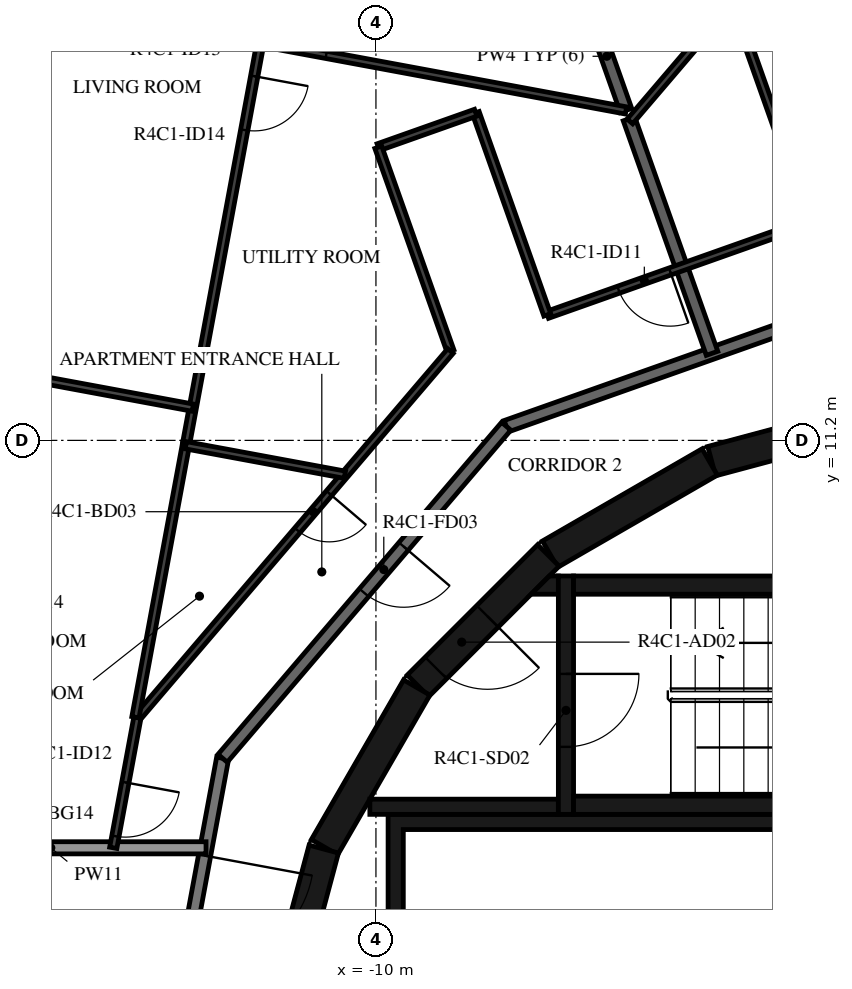
"""IFC4 building model, lengths in metres.
Left out: names, types, materials, properties, quantities, classifications, styles, units other than length and angle.
Written with IfcOpenShell. Run it as: python <this file> out.ifc"""

import sys

from ifc_helpers import new_model, si_unit, direction, frame, frame_2d, origin, place, context, subcontext, project, spatial, polyline, rectangle, outline, extrude, element, fill, save


model = new_model("IFC4")
c1 = context("Model", 3, precision=1e-05, world=origin(), true_north=direction((0.0, 1.0)))
c2 = subcontext(c1, "Body", "Model", "MODEL_VIEW")
j1 = project(units=[si_unit("LENGTHUNIT", "METRE"), si_unit("PLANEANGLEUNIT", "RADIAN")], contexts=[c1])
p1 = place(None, origin())
s1 = spatial("IfcSite", under=j1, at=p1, CompositionType="ELEMENT")
p2 = place(p1, origin())
s2 = spatial("IfcBuilding", under=s1, at=p2, CompositionType="ELEMENT")
p3 = place(p2, frame((0.0, 0.0, 176.2)))
s3 = spatial("IfcBuildingStorey", under=s2, at=p3, CompositionType="ELEMENT", Elevation=176.2)
for number, where, z_axis, x_axis in (
    (1, (-1.55, 11.643, 0.0), (0.0, 0.0, 1.0), (-0.966, -0.259, 0.0)),
    (2, (-4.51, 10.845, 0.0), (0.0, 0.0, 1.0), (-0.866, -0.5, 0.0)),
):
    element("IfcWall", number, at=place(p3, frame(where, z_axis=z_axis, x_axis=x_axis)), inside=s3, PredefinedType="SHEAR", context=c2, shape_type="SweptSolid", body=[
        extrude(rectangle(XDim=3.033, YDim=0.5, at=frame_2d((1.516, 0.0))), origin(), (0.0, 0.0, 1.0), 3.12),
    ])
p4 = place(p3, frame((-7.164, 9.308, 0.0), z_axis=(0.0, 0.0, 1.0), x_axis=(-0.707106781187, -0.707106781187, 0.0)))
e3 = element("IfcWall", 3, at=p4, inside=s3, PredefinedType="SHEAR", context=c2, shape_type="SweptSolid", body=[
    extrude(rectangle(XDim=3.032, YDim=0.5, at=frame_2d((1.516, 0.0))), origin(), (0.0, 0.0, 1.0), 3.12),
])
p5 = place(p4, frame((1.416, 0.0, 0.0)))
e4 = element("IfcOpeningElement", 4, at=p5, cuts=e3, PredefinedType="OPENING", context=c2, shape_type="SweptSolid", body=[
    extrude(rectangle(XDim=1.2, YDim=2.1, at=frame_2d((0.6, 1.05))), frame((0.0, 0.26, 0.0), z_axis=(0.0, -1.0, 0.0), x_axis=(1.0, 0.0, 0.0)), (0.0, 0.0, 1.0), 0.52),
])
for number, where, z_axis, x_axis in (
    (5, (-9.329, 7.137, 0.0), (0.0, 0.0, 1.0), (-0.5, -0.866, 0.0)),
    (6, (-10.858, 4.479, 0.0), (0.0, 0.0, 1.0), (-0.259, -0.966, 0.0)),
):
    element("IfcWall", number, at=place(p3, frame(where, z_axis=z_axis, x_axis=x_axis)), inside=s3, PredefinedType="SHEAR", context=c2, shape_type="SweptSolid", body=[
        extrude(rectangle(XDim=3.033, YDim=0.5, at=frame_2d((1.516, 0.0))), origin(), (0.0, 0.0, 1.0), 3.12),
    ])
for number, where, z_axis, x_axis in (
    (7, (-6.75, 5.2, 0.0), (0.0, 0.0, 1.0), (1.0, 0.0, 0.0)),
    (8, (-6.75, 8.82, 0.0), (0.0, 0.0, 1.0), (1.0, 0.0, 0.0)),
):
    element("IfcWall", number, at=place(p3, frame(where, z_axis=z_axis, x_axis=x_axis)), inside=s3, PredefinedType="SHEAR", context=c2, shape_type="SweptSolid", body=[
        extrude(rectangle(XDim=6.75, YDim=0.3, at=frame_2d((3.375, 0.0))), origin(), (0.0, 0.0, 1.0), 3.12),
    ])
p6 = place(p3, frame((-6.875, 8.97, 0.0), z_axis=(0.0, 0.0, 1.0), x_axis=(0.0, -1.0, 0.0)))
e9 = element("IfcWall", 9, at=p6, inside=s3, PredefinedType="SHEAR", context=c2, shape_type="SweptSolid", body=[
    extrude(rectangle(XDim=3.92, YDim=0.25, at=frame_2d((1.96, 0.0))), origin(), (0.0, 0.0, 1.0), 3.12),
])
p7 = place(p6, frame((1.61, 0.0, 0.0)))
e10 = element("IfcOpeningElement", 10, at=p7, cuts=e9, PredefinedType="OPENING", context=c2, shape_type="SweptSolid", body=[
    extrude(rectangle(XDim=1.2, YDim=2.1, at=frame_2d((0.6, 1.05))), frame((0.0, 0.135, 0.0), z_axis=(0.0, -1.0, 0.0), x_axis=(1.0, 0.0, 0.0)), (0.0, 0.0, 1.0), 0.27),
])
p8 = place(p3, frame((-7.0, 5.175, 0.0), z_axis=(0.0, 0.0, 1.0), x_axis=(-1.0, 0.0, 0.0)))
e11 = element("IfcWall", 11, at=p8, inside=s3, PredefinedType="SHEAR", context=c2, shape_type="SweptSolid", body=[
    extrude(rectangle(XDim=3.1, YDim=0.25, at=frame_2d((1.55, 0.0))), origin(), (0.0, 0.0, 1.0), 3.12),
])
p9 = place(p3, origin())
e12 = element("IfcWall", 12, at=p9, inside=s3, PredefinedType="SHEAR", context=c2, shape_type="SweptSolid", body=[
    extrude(outline(polyline([(-7.148, 8.97), (-7.0, 8.97), (-7.0, 8.67), (-7.448, 8.67), (-7.148, 8.97)])), origin(), (0.0, 0.0, 1.0), 3.12),
])
p10 = place(p3, origin())
e13 = element("IfcWall", 13, at=p10, inside=s3, PredefinedType="SHEAR", context=c2, shape_type="SweptSolid", body=[
    extrude(outline(polyline([(-9.55, 4.8), (-1.2, 4.8), (-1.2, 1.9), (-0.95, 1.9), (-0.95, 4.8), (0.95, 4.8), (0.95, 1.9), (1.2, 1.9), (1.2, 4.8), (3.1, 4.8), (3.1, 1.9), (3.35, 1.9), (3.35, 4.8), (5.25, 4.8), (5.25, 1.9), (5.5, 1.9), (5.5, 4.8), (7.4, 4.8), (7.4, 1.9), (7.65, 1.9), (7.65, 4.8), (9.55, 4.8), (9.55, 1.9), (9.8, 1.9), (9.8, 4.8), (9.8, 5.05), (-9.8, 5.05), (-9.8, 4.8), (-9.8, 1.9), (-9.55, 1.9), (-9.55, 4.8)])), origin(), (0.0, 0.0, 1.0), 3.12),
])
p11 = place(p3, frame((-12.521, 5.972, 0.0), z_axis=(0.0, 0.0, 1.0), x_axis=(-0.182251559718, -0.983251935661, 0.0)))
e14 = element("IfcWall", 14, at=p11, inside=s3, PredefinedType="STANDARD", context=c2, shape_type="SweptSolid", body=[
    extrude(rectangle(XDim=5.117, YDim=0.2, at=frame_2d((2.559, 0.0))), origin(), (0.0, 0.0, 1.0), 3.12),
])
p12 = place(p11, frame((1.627, 0.0, 0.0)))
e15 = element("IfcOpeningElement", 15, at=p12, cuts=e14, PredefinedType="OPENING", context=c2, shape_type="SweptSolid", body=[
    extrude(rectangle(XDim=1.8, YDim=2.1, at=frame_2d((0.9, 1.05))), frame((0.0, 0.11, 0.0), z_axis=(0.0, -1.0, 0.0), x_axis=(1.0, 0.0, 0.0)), (0.0, 0.0, 1.0), 0.22),
])
p13 = place(p3, frame((-2.359, 13.38, 0.0), z_axis=(0.0, 0.0, 1.0), x_axis=(-0.942647529236, -0.333789807551, 0.0)))
e16 = element("IfcWall", 16, at=p13, inside=s3, PredefinedType="STANDARD", context=c2, shape_type="SweptSolid", body=[
    extrude(rectangle(XDim=5.833, YDim=0.2, at=frame_2d((2.917, 0.0))), origin(), (0.0, 0.0, 1.0), 3.12),
])
p14 = place(p3, frame((-7.858, 11.433, 0.0), z_axis=(0.0, 0.0, 1.0), x_axis=(-0.649440801937, -0.760412154545, 0.0)))
e17 = element("IfcWall", 17, at=p14, inside=s3, PredefinedType="STANDARD", context=c2, shape_type="SweptSolid", body=[
    extrude(rectangle(XDim=7.181, YDim=0.2, at=frame_2d((3.59, 0.0))), origin(), (0.0, 0.0, 1.0), 3.12),
])
p15 = place(p14, frame((2.6, 0.0, 0.0)))
e18 = element("IfcOpeningElement", 18, at=p15, cuts=e17, PredefinedType="OPENING", context=c2, shape_type="SweptSolid", body=[
    extrude(rectangle(XDim=1.0, YDim=2.1, at=frame_2d((0.5, 1.05))), frame((0.0, 0.11, 0.0), z_axis=(0.0, -1.0, 0.0), x_axis=(1.0, 0.0, 0.0)), (0.0, 0.0, 1.0), 0.22),
])
p16 = place(p3, frame((-12.794, 4.5, 0.0), z_axis=(0.0, 0.0, 1.0), x_axis=(-1.0, 0.0, 0.0)))
e19 = element("IfcWall", 19, at=p16, inside=s3, PredefinedType="STANDARD", context=c2, shape_type="SweptSolid", body=[
    extrude(rectangle(XDim=5.106, YDim=0.2, at=frame_2d((2.553, 0.0))), origin(), (0.0, 0.0, 1.0), 2.73),
])
p17 = place(p3, frame((-5.839, 16.488, 0.0), z_axis=(0.0, 0.0, 1.0), x_axis=(0.333840515054, -0.942629572265, 0.0)))
e20 = element("IfcWall", 20, at=p17, inside=s3, PredefinedType="STANDARD", context=c2, shape_type="SweptSolid", body=[
    extrude(rectangle(XDim=4.092, YDim=0.2, at=frame_2d((2.046, 0.0))), origin(), (0.0, 0.0, 1.0), 3.12),
])
p18 = place(p3, frame((-6.518, 18.408, 0.0), z_axis=(0.0, 0.0, 1.0), x_axis=(0.333725210903, -0.942670400303, 0.0)))
e21 = element("IfcWall", 21, at=p18, inside=s3, PredefinedType="STANDARD", context=c2, shape_type="SweptSolid", body=[
    extrude(rectangle(XDim=1.89, YDim=0.2, at=frame_2d((0.945, 0.0))), origin(), (0.0, 0.0, 1.0), 3.12),
])
p19 = place(p3, frame((8.702, 12.206, 0.0), z_axis=(0.0, 0.0, 1.0), x_axis=(-0.760401313718, 0.649453494945, 0.0)))
e22 = element("IfcWall", 22, at=p19, inside=s3, PredefinedType="PARTITIONING", context=c2, shape_type="SweptSolid", body=[
    extrude(rectangle(XDim=16.724, YDim=0.12, at=frame_2d((8.362, 0.0))), origin(), (0.0, 0.0, 1.0), 3.12),
])
p20 = place(p19, frame((0.2, 0.0, 0.0)))
e23 = element("IfcOpeningElement", 23, at=p20, cuts=e22, PredefinedType="OPENING", context=c2, shape_type="SweptSolid", body=[
    extrude(rectangle(XDim=0.9, YDim=2.1, at=frame_2d((0.45, 1.05))), frame((0.0, 0.07, 0.0), z_axis=(0.0, -1.0, 0.0), x_axis=(1.0, 0.0, 0.0)), (0.0, 0.0, 1.0), 0.14),
])
p21 = place(p19, frame((8.02, 0.0, 0.0)))
e24 = element("IfcOpeningElement", 24, at=p21, cuts=e22, PredefinedType="OPENING", context=c2, shape_type="SweptSolid", body=[
    extrude(rectangle(XDim=0.9, YDim=2.1, at=frame_2d((0.45, 1.05))), frame((0.0, 0.07, 0.0), z_axis=(0.0, -1.0, 0.0), x_axis=(1.0, 0.0, 0.0)), (0.0, 0.0, 1.0), 0.14),
])
p22 = place(p19, frame((14.412, 0.0, 0.0)))
e25 = element("IfcOpeningElement", 25, at=p22, cuts=e22, PredefinedType="OPENING", context=c2, shape_type="SweptSolid", body=[
    extrude(rectangle(XDim=0.9, YDim=2.1, at=frame_2d((0.45, 1.05))), frame((0.0, 0.07, 0.0), z_axis=(0.0, -1.0, 0.0), x_axis=(1.0, 0.0, 0.0)), (0.0, 0.0, 1.0), 0.14),
])
p23 = place(p3, frame((-4.021, 18.101, 0.0), z_axis=(0.0, 0.0, 1.0), x_axis=(0.333811035895, -0.942640012048, 0.0)))
e26 = element("IfcWall", 26, at=p23, inside=s3, PredefinedType="PARTITIONING", context=c2, shape_type="SweptSolid", body=[
    extrude(rectangle(XDim=3.505, YDim=0.12, at=frame_2d((1.752, 0.0))), origin(), (0.0, 0.0, 1.0), 3.12),
])
p24 = place(p3, frame((-2.852, 14.797, 0.0), z_axis=(0.0, 0.0, 1.0), x_axis=(-0.942629664375, -0.333840254973, 0.0)))
e27 = element("IfcWall", 27, at=p24, inside=s3, PredefinedType="PARTITIONING", context=c2, shape_type="SweptSolid", body=[
    extrude(rectangle(XDim=4.593, YDim=0.12, at=frame_2d((2.297, 0.0))), origin(), (0.0, 0.0, 1.0), 3.12),
])
p25 = place(p24, frame((2.451, 0.0, 0.0)))
e28 = element("IfcOpeningElement", 28, at=p25, cuts=e27, PredefinedType="OPENING", context=c2, shape_type="SweptSolid", body=[
    extrude(rectangle(XDim=0.9, YDim=2.1, at=frame_2d((0.45, 1.05))), frame((0.0, 0.07, 0.0), z_axis=(0.0, -1.0, 0.0), x_axis=(1.0, 0.0, 0.0)), (0.0, 0.0, 1.0), 0.14),
])
p26 = place(p3, frame((-1.79, 21.167, 0.0), z_axis=(0.0, 0.0, 1.0), x_axis=(-0.649456490412, -0.7603987553, 0.0)))
e29 = element("IfcWall", 29, at=p26, inside=s3, PredefinedType="PARTITIONING", context=c2, shape_type="SweptSolid", body=[
    extrude(rectangle(XDim=6.21, YDim=0.12, at=frame_2d((3.105, 0.0))), origin(), (0.0, 0.0, 1.0), 3.12),
])
p27 = place(p26, frame((0.2, 0.0, 0.0)))
e30 = element("IfcOpeningElement", 30, at=p27, cuts=e29, PredefinedType="OPENING", context=c2, shape_type="SweptSolid", body=[
    extrude(rectangle(XDim=0.9, YDim=2.1, at=frame_2d((0.45, 1.05))), frame((0.0, 0.07, 0.0), z_axis=(0.0, -1.0, 0.0), x_axis=(1.0, 0.0, 0.0)), (0.0, 0.0, 1.0), 0.14),
])
p28 = place(p3, frame((-7.181, 13.263, 0.0), z_axis=(0.0, 0.0, 1.0), x_axis=(-0.333822798183, 0.942635846663, 0.0)))
e31 = element("IfcWall", 31, at=p28, inside=s3, PredefinedType="PARTITIONING", context=c2, shape_type="SweptSolid", body=[
    extrude(rectangle(XDim=3.527, YDim=0.12, at=frame_2d((1.764, 0.0))), origin(), (0.0, 0.0, 1.0), 3.12),
])
p29 = place(p3, frame((-8.359, 16.588, 0.0), z_axis=(0.0, 0.0, 1.0), x_axis=(-0.942661115325, -0.333751436931, 0.0)))
e32 = element("IfcWall", 32, at=p29, inside=s3, PredefinedType="PARTITIONING", context=c2, shape_type="SweptSolid", body=[
    extrude(rectangle(XDim=1.7, YDim=0.12, at=frame_2d((0.85, 0.0))), origin(), (0.0, 0.0, 1.0), 3.12),
])
p30 = place(p3, frame((-9.961, 16.021, 0.0), z_axis=(0.0, 0.0, 1.0), x_axis=(0.333803930912, -0.94264252806, 0.0)))
e33 = element("IfcWall", 33, at=p30, inside=s3, PredefinedType="PARTITIONING", context=c2, shape_type="SweptSolid", body=[
    extrude(rectangle(XDim=3.556, YDim=0.12, at=frame_2d((1.778, 0.0))), origin(), (0.0, 0.0, 1.0), 3.12),
])
p31 = place(p3, frame((-8.774, 12.669, 0.0), z_axis=(0.0, 0.0, 1.0), x_axis=(-0.649446157105, -0.760407580855, 0.0)))
e34 = element("IfcWall", 34, at=p31, inside=s3, PredefinedType="PARTITIONING", context=c2, shape_type="SweptSolid", body=[
    extrude(rectangle(XDim=7.927, YDim=0.12, at=frame_2d((3.964, 0.0))), origin(), (0.0, 0.0, 1.0), 3.12),
])
p32 = place(p31, frame((3.074, 0.0, 0.0)))
e35 = element("IfcOpeningElement", 35, at=p32, cuts=e34, PredefinedType="OPENING", context=c2, shape_type="SweptSolid", body=[
    extrude(rectangle(XDim=0.8, YDim=2.1, at=frame_2d((0.4, 1.05))), frame((0.0, 0.07, 0.0), z_axis=(0.0, -1.0, 0.0), x_axis=(1.0, 0.0, 0.0)), (0.0, 0.0, 1.0), 0.14),
])
p33 = place(p3, frame((-13.923, 6.641, 0.0), z_axis=(0.0, 0.0, 1.0), x_axis=(-0.182209715759, -0.983259690765, 0.0)))
e36 = element("IfcWall", 36, at=p33, inside=s3, PredefinedType="PARTITIONING", context=c2, shape_type="SweptSolid", body=[
    extrude(rectangle(XDim=2.177, YDim=0.12, at=frame_2d((1.089, 0.0))), origin(), (0.0, 0.0, 1.0), 3.12),
])
p34 = place(p33, frame((1.083, 0.0, 0.0)))
e37 = element("IfcOpeningElement", 37, at=p34, cuts=e36, PredefinedType="OPENING", context=c2, shape_type="SweptSolid", body=[
    extrude(rectangle(XDim=0.9, YDim=2.1, at=frame_2d((0.45, 1.05))), frame((0.0, 0.07, 0.0), z_axis=(0.0, -1.0, 0.0), x_axis=(1.0, 0.0, 0.0)), (0.0, 0.0, 1.0), 0.14),
])
p35 = place(p3, frame((-13.955, 6.647, 0.0), z_axis=(0.0, 0.0, 1.0), x_axis=(0.182264522222, 0.983249532896, 0.0)))
e38 = element("IfcWall", 38, at=p35, inside=s3, PredefinedType="PARTITIONING", context=c2, shape_type="SweptSolid", body=[
    extrude(rectangle(XDim=4.589, YDim=0.12, at=frame_2d((2.294, 0.0))), origin(), (0.0, 0.0, 1.0), 3.12),
])
p36 = place(p3, frame((-11.899, 17.74, 0.0), z_axis=(0.0, 0.0, 1.0), x_axis=(0.983254721409, -0.182236529889, 0.0)))
e39 = element("IfcWall", 39, at=p36, inside=s3, PredefinedType="PARTITIONING", context=c2, shape_type="SweptSolid", body=[
    extrude(rectangle(XDim=6.114, YDim=0.12, at=frame_2d((3.057, 0.0))), origin(), (0.0, 0.0, 1.0), 3.12),
])
p37 = place(p36, frame((0.2, 0.0, 0.0)))
e40 = element("IfcOpeningElement", 40, at=p37, cuts=e39, PredefinedType="OPENING", context=c2, shape_type="SweptSolid", body=[
    extrude(rectangle(XDim=0.9, YDim=2.1, at=frame_2d((0.45, 1.05))), frame((0.0, 0.07, 0.0), z_axis=(0.0, -1.0, 0.0), x_axis=(1.0, 0.0, 0.0)), (0.0, 0.0, 1.0), 0.14),
])
p38 = place(p3, frame((-11.396, 20.453, 0.0), z_axis=(0.0, 0.0, 1.0), x_axis=(-0.182223370439, -0.983257160292, 0.0)))
e41 = element("IfcWall", 41, at=p38, inside=s3, PredefinedType="PARTITIONING", context=c2, shape_type="SweptSolid", body=[
    extrude(rectangle(XDim=9.452, YDim=0.12, at=frame_2d((4.726, 0.0))), origin(), (0.0, 0.0, 1.0), 3.12),
])
p39 = place(p38, frame((3.319, 0.0, 0.0)))
e42 = element("IfcOpeningElement", 42, at=p39, cuts=e41, PredefinedType="OPENING", context=c2, shape_type="SweptSolid", body=[
    extrude(rectangle(XDim=0.9, YDim=2.1, at=frame_2d((0.45, 1.05))), frame((0.0, 0.07, 0.0), z_axis=(0.0, -1.0, 0.0), x_axis=(1.0, 0.0, 0.0)), (0.0, 0.0, 1.0), 0.14),
])
p40 = place(p38, frame((0.2, 0.0, 0.0)))
e43 = element("IfcOpeningElement", 43, at=p40, cuts=e41, PredefinedType="OPENING", context=c2, shape_type="SweptSolid", body=[
    extrude(rectangle(XDim=0.9, YDim=2.1, at=frame_2d((0.45, 1.05))), frame((0.0, 0.07, 0.0), z_axis=(0.0, -1.0, 0.0), x_axis=(1.0, 0.0, 0.0)), (0.0, 0.0, 1.0), 0.14),
])
p41 = place(p3, frame((-13.126, 11.12, 0.0), z_axis=(0.0, 0.0, 1.0), x_axis=(0.983257646361, -0.182220747645, 0.0)))
e44 = element("IfcWall", 44, at=p41, inside=s3, PredefinedType="PARTITIONING", context=c2, shape_type="SweptSolid", body=[
    extrude(rectangle(XDim=2.659, YDim=0.12, at=frame_2d((1.33, 0.0))), origin(), (0.0, 0.0, 1.0), 3.12),
])
p42 = place(p3, frame((-16.552, 12.394, 0.0), z_axis=(0.0, 0.0, 1.0), x_axis=(0.983257712156, -0.182220392618, 0.0)))
e45 = element("IfcWall", 45, at=p42, inside=s3, PredefinedType="PARTITIONING", context=c2, shape_type="SweptSolid", body=[
    extrude(rectangle(XDim=3.6, YDim=0.12, at=frame_2d((1.8, 0.0))), origin(), (0.0, 0.0, 1.0), 2.73),
])
p43 = place(p7, origin())
e46 = element("IfcDoor", 46, at=p43, inside=s3, OperationType="SINGLE_SWING_LEFT", PredefinedType="DOOR", context=c2, shape_type="SweptSolid", body=[
    extrude(rectangle(XDim=1.2, YDim=2.1, at=frame_2d((0.6, 1.05))), frame((0.0, 0.025, 0.0), z_axis=(0.0, -1.0, 0.0), x_axis=(1.0, 0.0, 0.0)), (0.0, 0.0, 1.0), 0.05),
])
fill(e10, e46)
p44 = place(p5, origin())
e47 = element("IfcDoor", 47, at=p44, inside=s3, OperationType="SINGLE_SWING_RIGHT", PredefinedType="DOOR", context=c2, shape_type="SweptSolid", body=[
    extrude(rectangle(XDim=1.2, YDim=2.1, at=frame_2d((0.6, 1.05))), frame((0.0, 0.025, 0.0), z_axis=(0.0, -1.0, 0.0), x_axis=(1.0, 0.0, 0.0)), (0.0, 0.0, 1.0), 0.05),
])
fill(e4, e47)
p45 = place(p15, origin())
e48 = element("IfcDoor", 48, at=p45, inside=s3, OperationType="SINGLE_SWING_LEFT", PredefinedType="DOOR", context=c2, shape_type="SweptSolid", body=[
    extrude(rectangle(XDim=1.0, YDim=2.1, at=frame_2d((0.5, 1.05))), frame((0.0, 0.025, 0.0), z_axis=(0.0, -1.0, 0.0), x_axis=(1.0, 0.0, 0.0)), (0.0, 0.0, 1.0), 0.05),
])
fill(e18, e48)
p46 = place(p25, origin())
e49 = element("IfcDoor", 49, at=p46, inside=s3, OperationType="SINGLE_SWING_LEFT", PredefinedType="DOOR", context=c2, shape_type="SweptSolid", body=[
    extrude(rectangle(XDim=0.9, YDim=2.1, at=frame_2d((0.45, 1.05))), frame((0.0, 0.025, 0.0), z_axis=(0.0, -1.0, 0.0), x_axis=(1.0, 0.0, 0.0)), (0.0, 0.0, 1.0), 0.05),
])
fill(e28, e49)
p47 = place(p32, origin())
e50 = element("IfcDoor", 50, at=p47, inside=s3, OperationType="SINGLE_SWING_LEFT", PredefinedType="DOOR", context=c2, shape_type="SweptSolid", body=[
    extrude(rectangle(XDim=0.8, YDim=2.1, at=frame_2d((0.4, 1.05))), frame((0.0, 0.025, 0.0), z_axis=(0.0, -1.0, 0.0), x_axis=(1.0, 0.0, 0.0)), (0.0, 0.0, 1.0), 0.05),
])
fill(e35, e50)
p48 = place(p34, origin())
e51 = element("IfcDoor", 51, at=p48, inside=s3, OperationType="SINGLE_SWING_LEFT", PredefinedType="DOOR", context=c2, shape_type="SweptSolid", body=[
    extrude(rectangle(XDim=0.9, YDim=2.1, at=frame_2d((0.45, 1.05))), frame((0.0, 0.025, 0.0), z_axis=(0.0, -1.0, 0.0), x_axis=(1.0, 0.0, 0.0)), (0.0, 0.0, 1.0), 0.05),
])
fill(e37, e51)
p49 = place(p37, origin())
e52 = element("IfcDoor", 52, at=p49, inside=s3, OperationType="SINGLE_SWING_LEFT", PredefinedType="DOOR", context=c2, shape_type="SweptSolid", body=[
    extrude(rectangle(XDim=0.9, YDim=2.1, at=frame_2d((0.45, 1.05))), frame((0.0, 0.025, 0.0), z_axis=(0.0, -1.0, 0.0), x_axis=(1.0, 0.0, 0.0)), (0.0, 0.0, 1.0), 0.05),
])
fill(e40, e52)
p50 = place(p39, origin())
e53 = element("IfcDoor", 53, at=p50, inside=s3, OperationType="SINGLE_SWING_LEFT", PredefinedType="DOOR", context=c2, shape_type="SweptSolid", body=[
    extrude(rectangle(XDim=0.9, YDim=2.1, at=frame_2d((0.45, 1.05))), frame((0.0, 0.025, 0.0), z_axis=(0.0, -1.0, 0.0), x_axis=(1.0, 0.0, 0.0)), (0.0, 0.0, 1.0), 0.05),
])
fill(e42, e53)
p51 = place(p12, origin())
e54 = element("IfcDoor", 54, at=p51, inside=s3, OperationType="DOUBLE_DOOR_SINGLE_SWING", PredefinedType="DOOR", context=c2, shape_type="SweptSolid", body=[
    extrude(rectangle(XDim=1.8, YDim=2.1, at=frame_2d((0.9, 1.05))), frame((0.0, 0.025, 0.0), z_axis=(0.0, -1.0, 0.0), x_axis=(1.0, 0.0, 0.0)), (0.0, 0.0, 1.0), 0.05),
])
fill(e15, e54)
save(model, sys.argv[1])
